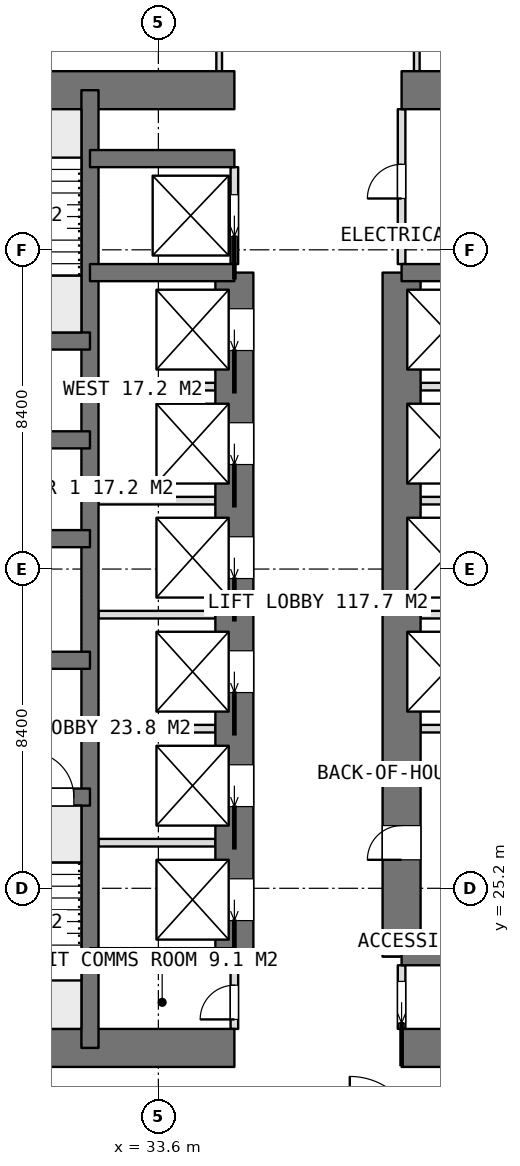
"""IFC4 building model, lengths in metres.
Left out: names, types, materials, properties, quantities, classifications, styles, units other than length and angle.
Written with IfcOpenShell. Run it as: python <this file> out.ifc"""

import sys

from ifc_helpers import new_model, si_unit, direction, frame, frame_2d, origin, place, context, subcontext, project, spatial, rectangle, extrude, element, fill, save


model = new_model("IFC4")
c1 = context("Model", 3, precision=1e-05, world=origin(), true_north=direction((0.0, 1.0)))
c2 = subcontext(c1, "Body", "Model", "MODEL_VIEW")
j1 = project(units=[si_unit("LENGTHUNIT", "METRE"), si_unit("PLANEANGLEUNIT", "RADIAN")], contexts=[c1])
p1 = place(None, origin())
s1 = spatial("IfcSite", under=j1, at=p1, CompositionType="ELEMENT")
p2 = place(p1, origin())
s2 = spatial("IfcBuilding", under=s1, at=p2, CompositionType="ELEMENT")
p3 = place(p2, frame((0.0, 0.0, 159.05)))
s3 = spatial("IfcBuildingStorey", under=s2, at=p3, CompositionType="ELEMENT", Elevation=159.05)
p4 = place(p3, frame((25.2, 21.0, 0.0), z_axis=(0.0, 0.0, 1.0), x_axis=(1.0, 0.0, 0.0)))
e1 = element("IfcWall", 1, at=p4, inside=s3, PredefinedType="SHEAR", context=c2, shape_type="SweptSolid", body=[
    extrude(rectangle(XDim=10.4, YDim=1.0, at=frame_2d((5.2, 0.0))), origin(), (0.0, 0.0, 1.0), 3.75),
])
p5 = place(p3, frame((40.0, 21.0, 0.0), z_axis=(0.0, 0.0, 1.0), x_axis=(1.0, 0.0, 0.0)))
e2 = element("IfcWall", 2, at=p5, inside=s3, PredefinedType="SHEAR", context=c2, shape_type="SweptSolid", body=[
    extrude(rectangle(XDim=10.4, YDim=1.0, at=frame_2d((5.2, 0.0))), origin(), (0.0, 0.0, 1.0), 3.75),
])
p6 = place(p3, frame((25.2, 46.2, 0.0), z_axis=(0.0, 0.0, 1.0), x_axis=(1.0, 0.0, 0.0)))
e3 = element("IfcWall", 3, at=p6, inside=s3, PredefinedType="SHEAR", context=c2, shape_type="SweptSolid", body=[
    extrude(rectangle(XDim=10.4, YDim=1.0, at=frame_2d((5.2, 0.0))), origin(), (0.0, 0.0, 1.0), 3.75),
])
p7 = place(p3, frame((40.0, 46.2, 0.0), z_axis=(0.0, 0.0, 1.0), x_axis=(1.0, 0.0, 0.0)))
e4 = element("IfcWall", 4, at=p7, inside=s3, PredefinedType="SHEAR", context=c2, shape_type="SweptSolid", body=[
    extrude(rectangle(XDim=10.4, YDim=1.0, at=frame_2d((5.2, 0.0))), origin(), (0.0, 0.0, 1.0), 3.75),
])
p8 = place(p3, frame((31.8, 21.0, 0.0), z_axis=(0.0, 0.0, 1.0), x_axis=(0.0, 1.0, 0.0)))
e5 = element("IfcWall", 5, at=p8, inside=s3, PredefinedType="SHEAR", context=c2, shape_type="SweptSolid", body=[
    extrude(rectangle(XDim=25.2, YDim=0.45, at=frame_2d((12.6, 0.0))), origin(), (0.0, 0.0, 1.0), 3.75),
])
p9 = place(p3, frame((35.6, 23.4, 0.0), z_axis=(0.0, 0.0, 1.0), x_axis=(0.0, 1.0, 0.0)))
e6 = element("IfcWall", 6, at=p9, inside=s3, PredefinedType="SHEAR", context=c2, shape_type="SweptSolid", body=[
    extrude(rectangle(XDim=18.0, YDim=1.0, at=frame_2d((9.0, 0.0))), origin(), (0.0, 0.0, 1.0), 3.75),
])
p10 = place(p9, frame((0.95, 0.0, 0.0)))
e7 = element("IfcOpeningElement", 7, at=p10, cuts=e6, PredefinedType="OPENING", context=c2, shape_type="SweptSolid", body=[
    extrude(rectangle(XDim=1.1, YDim=2.1, at=frame_2d((0.55, 1.05))), frame((0.0, 0.51, 0.0), z_axis=(0.0, -1.0, 0.0), x_axis=(1.0, 0.0, 0.0)), (0.0, 0.0, 1.0), 1.02),
])
p11 = place(p9, frame((3.95, 0.0, 0.0)))
e8 = element("IfcOpeningElement", 8, at=p11, cuts=e6, PredefinedType="OPENING", context=c2, shape_type="SweptSolid", body=[
    extrude(rectangle(XDim=1.1, YDim=2.1, at=frame_2d((0.55, 1.05))), frame((0.0, 0.51, 0.0), z_axis=(0.0, -1.0, 0.0), x_axis=(1.0, 0.0, 0.0)), (0.0, 0.0, 1.0), 1.02),
])
p12 = place(p9, frame((6.95, 0.0, 0.0)))
e9 = element("IfcOpeningElement", 9, at=p12, cuts=e6, PredefinedType="OPENING", context=c2, shape_type="SweptSolid", body=[
    extrude(rectangle(XDim=1.1, YDim=2.1, at=frame_2d((0.55, 1.05))), frame((0.0, 0.51, 0.0), z_axis=(0.0, -1.0, 0.0), x_axis=(1.0, 0.0, 0.0)), (0.0, 0.0, 1.0), 1.02),
])
p13 = place(p9, frame((9.95, 0.0, 0.0)))
e10 = element("IfcOpeningElement", 10, at=p13, cuts=e6, PredefinedType="OPENING", context=c2, shape_type="SweptSolid", body=[
    extrude(rectangle(XDim=1.1, YDim=2.1, at=frame_2d((0.55, 1.05))), frame((0.0, 0.51, 0.0), z_axis=(0.0, -1.0, 0.0), x_axis=(1.0, 0.0, 0.0)), (0.0, 0.0, 1.0), 1.02),
])
p14 = place(p9, frame((12.95, 0.0, 0.0)))
e11 = element("IfcOpeningElement", 11, at=p14, cuts=e6, PredefinedType="OPENING", context=c2, shape_type="SweptSolid", body=[
    extrude(rectangle(XDim=1.1, YDim=2.1, at=frame_2d((0.55, 1.05))), frame((0.0, 0.51, 0.0), z_axis=(0.0, -1.0, 0.0), x_axis=(1.0, 0.0, 0.0)), (0.0, 0.0, 1.0), 1.02),
])
p15 = place(p9, frame((15.95, 0.0, 0.0)))
e12 = element("IfcOpeningElement", 12, at=p15, cuts=e6, PredefinedType="OPENING", context=c2, shape_type="SweptSolid", body=[
    extrude(rectangle(XDim=1.1, YDim=2.1, at=frame_2d((0.55, 1.05))), frame((0.0, 0.51, 0.0), z_axis=(0.0, -1.0, 0.0), x_axis=(1.0, 0.0, 0.0)), (0.0, 0.0, 1.0), 1.02),
])
p16 = place(p3, frame((40.0, 23.4, 0.0), z_axis=(0.0, 0.0, 1.0), x_axis=(0.0, 1.0, 0.0)))
e13 = element("IfcWall", 13, at=p16, inside=s3, PredefinedType="SHEAR", context=c2, shape_type="SweptSolid", body=[
    extrude(rectangle(XDim=18.0, YDim=1.0, at=frame_2d((9.0, 0.0))), origin(), (0.0, 0.0, 1.0), 3.75),
])
p17 = place(p16, frame((2.55, 0.0, 0.0)))
e14 = element("IfcOpeningElement", 14, at=p17, cuts=e13, PredefinedType="OPENING", context=c2, shape_type="SweptSolid", body=[
    extrude(rectangle(XDim=0.9, YDim=2.1, at=frame_2d((0.45, 1.05))), frame((0.0, 0.51, 0.0), z_axis=(0.0, -1.0, 0.0), x_axis=(1.0, 0.0, 0.0)), (0.0, 0.0, 1.0), 1.02),
])
for number, where, z_axis, x_axis in (
    (15, (31.8, 23.4, 0.0), (0.0, 0.0, 1.0), (1.0, 0.0, 0.0)),
    (16, (31.8, 41.4, 0.0), (0.0, 0.0, 1.0), (1.0, 0.0, 0.0)),
    (17, (31.8, 44.4, 0.0), (0.0, 0.0, 1.0), (1.0, 0.0, 0.0)),
    (18, (40.0, 23.4, 0.0), (0.0, 0.0, 1.0), (1.0, 0.0, 0.0)),
    (19, (40.0, 41.4, 0.0), (0.0, 0.0, 1.0), (1.0, 0.0, 0.0)),
):
    element("IfcWall", number, at=place(p3, frame(where, z_axis=z_axis, x_axis=x_axis)), inside=s3, PredefinedType="SHEAR", context=c2, shape_type="SweptSolid", body=[
        extrude(rectangle(XDim=3.8, YDim=0.45, at=frame_2d((1.9, 0.0))), origin(), (0.0, 0.0, 1.0), 3.75),
    ])
p18 = place(p3, frame((25.2, 27.6, 0.0), z_axis=(0.0, 0.0, 1.0), x_axis=(1.0, 0.0, 0.0)))
e20 = element("IfcWall", 20, at=p18, inside=s3, PredefinedType="SHEAR", context=c2, shape_type="SweptSolid", body=[
    extrude(rectangle(XDim=6.6, YDim=0.45, at=frame_2d((3.3, 0.0))), origin(), (0.0, 0.0, 1.0), 3.75),
])
p19 = place(p18, frame((4.975, 0.0, 0.0)))
e21 = element("IfcOpeningElement", 21, at=p19, cuts=e20, PredefinedType="OPENING", context=c2, shape_type="SweptSolid", body=[
    extrude(rectangle(XDim=1.2, YDim=2.1, at=frame_2d((0.6, 1.05))), frame((0.0, 0.235, 0.0), z_axis=(0.0, -1.0, 0.0), x_axis=(1.0, 0.0, 0.0)), (0.0, 0.0, 1.0), 0.47),
])
p20 = place(p3, frame((25.2, 31.2, 0.0), z_axis=(0.0, 0.0, 1.0), x_axis=(1.0, 0.0, 0.0)))
e22 = element("IfcWall", 22, at=p20, inside=s3, PredefinedType="SHEAR", context=c2, shape_type="SweptSolid", body=[
    extrude(rectangle(XDim=6.6, YDim=0.45, at=frame_2d((3.3, 0.0))), origin(), (0.0, 0.0, 1.0), 3.75),
])
p21 = place(p20, frame((2.65, 0.0, 0.0)))
e23 = element("IfcOpeningElement", 23, at=p21, cuts=e22, PredefinedType="OPENING", context=c2, shape_type="SweptSolid", body=[
    extrude(rectangle(XDim=1.3, YDim=2.1, at=frame_2d((0.65, 1.05))), frame((0.0, 0.235, 0.0), z_axis=(0.0, -1.0, 0.0), x_axis=(1.0, 0.0, 0.0)), (0.0, 0.0, 1.0), 0.47),
])
for number, where, z_axis, x_axis in (
    (24, (25.2, 34.4, 0.0), (0.0, 0.0, 1.0), (1.0, 0.0, 0.0)),
    (25, (25.2, 37.0, 0.0), (0.0, 0.0, 1.0), (1.0, 0.0, 0.0)),
    (26, (25.2, 39.6, 0.0), (0.0, 0.0, 1.0), (1.0, 0.0, 0.0)),
):
    element("IfcWall", number, at=place(p3, frame(where, z_axis=z_axis, x_axis=x_axis)), inside=s3, PredefinedType="SHEAR", context=c2, shape_type="SweptSolid", body=[
        extrude(rectangle(XDim=6.6, YDim=0.45, at=frame_2d((3.3, 0.0))), origin(), (0.0, 0.0, 1.0), 3.75),
    ])
for number, where, z_axis, x_axis in (
    (27, (32.025, 26.4, 0.0), (0.0, 0.0, 1.0), (1.0, 0.0, 0.0)),
    (28, (32.025, 29.4, 0.0), (0.0, 0.0, 1.0), (1.0, 0.0, 0.0)),
    (29, (32.025, 32.4, 0.0), (0.0, 0.0, 1.0), (1.0, 0.0, 0.0)),
    (30, (32.025, 35.4, 0.0), (0.0, 0.0, 1.0), (1.0, 0.0, 0.0)),
    (31, (32.025, 38.4, 0.0), (0.0, 0.0, 1.0), (1.0, 0.0, 0.0)),
):
    element("IfcWall", number, at=place(p3, frame(where, z_axis=z_axis, x_axis=x_axis)), inside=s3, PredefinedType="PARTITIONING", context=c2, shape_type="SweptSolid", body=[
        extrude(rectangle(XDim=3.075, YDim=0.2, at=frame_2d((1.538, 0.0))), origin(), (0.0, 0.0, 1.0), 3.4),
    ])
for number, where, z_axis, x_axis in (
    (32, (40.5, 29.4, 0.0), (0.0, 0.0, 1.0), (1.0, 0.0, 0.0)),
    (33, (40.5, 32.4, 0.0), (0.0, 0.0, 1.0), (1.0, 0.0, 0.0)),
    (34, (40.5, 35.4, 0.0), (0.0, 0.0, 1.0), (1.0, 0.0, 0.0)),
    (35, (40.5, 38.4, 0.0), (0.0, 0.0, 1.0), (1.0, 0.0, 0.0)),
):
    element("IfcWall", number, at=place(p3, frame(where, z_axis=z_axis, x_axis=x_axis)), inside=s3, PredefinedType="PARTITIONING", context=c2, shape_type="SweptSolid", body=[
        extrude(rectangle(XDim=3.075, YDim=0.2, at=frame_2d((1.538, 0.0))), origin(), (0.0, 0.0, 1.0), 3.4),
    ])
p22 = place(p3, frame((40.0, 21.5, 0.0), z_axis=(0.0, 0.0, 1.0), x_axis=(0.0, 1.0, 0.0)))
e36 = element("IfcWall", 36, at=p22, inside=s3, PredefinedType="PARTITIONING", context=c2, shape_type="SweptSolid", body=[
    extrude(rectangle(XDim=1.675, YDim=0.2, at=frame_2d((0.837, 0.0))), origin(), (0.0, 0.0, 1.0), 3.4),
])
p23 = place(p22, frame((0.15, 0.0, 0.0)))
e37 = element("IfcOpeningElement", 37, at=p23, cuts=e36, PredefinedType="OPENING", context=c2, shape_type="SweptSolid", body=[
    extrude(rectangle(XDim=1.1, YDim=2.1, at=frame_2d((0.55, 1.05))), frame((0.0, 0.11, 0.0), z_axis=(0.0, -1.0, 0.0), x_axis=(1.0, 0.0, 0.0)), (0.0, 0.0, 1.0), 0.22),
])
p24 = place(p3, frame((40.0, 41.625, 0.0), z_axis=(0.0, 0.0, 1.0), x_axis=(0.0, 1.0, 0.0)))
e38 = element("IfcWall", 38, at=p24, inside=s3, PredefinedType="PARTITIONING", context=c2, shape_type="SweptSolid", body=[
    extrude(rectangle(XDim=4.075, YDim=0.2, at=frame_2d((2.038, 0.0))), origin(), (0.0, 0.0, 1.0), 3.4),
])
p25 = place(p24, frame((1.725, 0.0, 0.0)))
e39 = element("IfcOpeningElement", 39, at=p25, cuts=e38, PredefinedType="OPENING", context=c2, shape_type="SweptSolid", body=[
    extrude(rectangle(XDim=0.9, YDim=2.1, at=frame_2d((0.45, 1.05))), frame((0.0, 0.11, 0.0), z_axis=(0.0, -1.0, 0.0), x_axis=(1.0, 0.0, 0.0)), (0.0, 0.0, 1.0), 0.22),
])
p26 = place(p3, frame((35.6, 41.625, 0.0), z_axis=(0.0, 0.0, 1.0), x_axis=(0.0, 1.0, 0.0)))
e40 = element("IfcWall", 40, at=p26, inside=s3, PredefinedType="PARTITIONING", context=c2, shape_type="SweptSolid", body=[
    extrude(rectangle(XDim=2.55, YDim=0.2, at=frame_2d((1.275, 0.0))), origin(), (0.0, 0.0, 1.0), 3.4),
])
p27 = place(p26, frame((0.725, 0.0, 0.0)))
e41 = element("IfcOpeningElement", 41, at=p27, cuts=e40, PredefinedType="OPENING", context=c2, shape_type="SweptSolid", body=[
    extrude(rectangle(XDim=1.1, YDim=2.1, at=frame_2d((0.55, 1.05))), frame((0.0, 0.11, 0.0), z_axis=(0.0, -1.0, 0.0), x_axis=(1.0, 0.0, 0.0)), (0.0, 0.0, 1.0), 0.22),
])
p28 = place(p3, frame((35.6, 21.5, 0.0), z_axis=(0.0, 0.0, 1.0), x_axis=(0.0, 1.0, 0.0)))
e42 = element("IfcWall", 42, at=p28, inside=s3, PredefinedType="PARTITIONING", context=c2, shape_type="SweptSolid", body=[
    extrude(rectangle(XDim=1.675, YDim=0.2, at=frame_2d((0.837, 0.0))), origin(), (0.0, 0.0, 1.0), 3.4),
])
p29 = place(p28, frame((0.25, 0.0, 0.0)))
e43 = element("IfcOpeningElement", 43, at=p29, cuts=e42, PredefinedType="OPENING", context=c2, shape_type="SweptSolid", body=[
    extrude(rectangle(XDim=0.9, YDim=2.1, at=frame_2d((0.45, 1.05))), frame((0.0, 0.11, 0.0), z_axis=(0.0, -1.0, 0.0), x_axis=(1.0, 0.0, 0.0)), (0.0, 0.0, 1.0), 0.22),
])
for number, where, z_axis, x_axis in (
    (44, (40.4, 46.7, 0.0), (0.0, 0.0, 1.0), (0.0, 1.0, 0.0)),
    (45, (35.2, 46.7, 0.0), (0.0, 0.0, 1.0), (0.0, 1.0, 0.0)),
):
    element("IfcWall", number, at=place(p3, frame(where, z_axis=z_axis, x_axis=x_axis)), inside=s3, PredefinedType="PARTITIONING", context=c2, shape_type="SweptSolid", body=[
        extrude(rectangle(XDim=2.625, YDim=0.15, at=frame_2d((1.312, 0.0))), origin(), (0.0, 0.0, 1.0), 3.4),
    ])
p30 = place(p23, origin())
e46 = element("IfcDoor", 46, at=p30, inside=s3, OperationType="SLIDING_TO_LEFT", PredefinedType="DOOR", context=c2, shape_type="SweptSolid", body=[
    extrude(rectangle(XDim=1.1, YDim=2.1, at=frame_2d((0.55, 1.05))), frame((0.0, 0.025, 0.0), z_axis=(0.0, -1.0, 0.0), x_axis=(1.0, 0.0, 0.0)), (0.0, 0.0, 1.0), 0.05),
])
fill(e37, e46)
p31 = place(p29, origin())
e47 = element("IfcDoor", 47, at=p31, inside=s3, OperationType="SINGLE_SWING_LEFT", PredefinedType="DOOR", context=c2, shape_type="SweptSolid", body=[
    extrude(rectangle(XDim=0.9, YDim=2.1, at=frame_2d((0.45, 1.05))), frame((0.0, 0.025, 0.0), z_axis=(0.0, -1.0, 0.0), x_axis=(1.0, 0.0, 0.0)), (0.0, 0.0, 1.0), 0.05),
])
fill(e43, e47)
p32 = place(p25, origin())
e48 = element("IfcDoor", 48, at=p32, inside=s3, OperationType="SINGLE_SWING_LEFT", PredefinedType="DOOR", context=c2, shape_type="SweptSolid", body=[
    extrude(rectangle(XDim=0.9, YDim=2.1, at=frame_2d((0.45, 1.05))), frame((0.0, 0.025, 0.0), z_axis=(0.0, -1.0, 0.0), x_axis=(1.0, 0.0, 0.0)), (0.0, 0.0, 1.0), 0.05),
])
fill(e39, e48)
p33 = place(p17, origin())
e49 = element("IfcDoor", 49, at=p33, inside=s3, OperationType="SINGLE_SWING_LEFT", PredefinedType="DOOR", context=c2, shape_type="SweptSolid", body=[
    extrude(rectangle(XDim=0.9, YDim=2.1, at=frame_2d((0.45, 1.05))), frame((0.0, 0.025, 0.0), z_axis=(0.0, -1.0, 0.0), x_axis=(1.0, 0.0, 0.0)), (0.0, 0.0, 1.0), 0.05),
])
fill(e14, e49)
p34 = place(p10, origin())
e50 = element("IfcDoor", 50, at=p34, inside=s3, OperationType="SLIDING_TO_LEFT", PredefinedType="USERDEFINED", context=c2, shape_type="SweptSolid", body=[
    extrude(rectangle(XDim=1.1, YDim=2.1, at=frame_2d((0.55, 1.05))), frame((0.0, 0.025, 0.0), z_axis=(0.0, -1.0, 0.0), x_axis=(1.0, 0.0, 0.0)), (0.0, 0.0, 1.0), 0.05),
])
fill(e7, e50)
p35 = place(p11, origin())
e51 = element("IfcDoor", 51, at=p35, inside=s3, OperationType="SLIDING_TO_LEFT", PredefinedType="USERDEFINED", context=c2, shape_type="SweptSolid", body=[
    extrude(rectangle(XDim=1.1, YDim=2.1, at=frame_2d((0.55, 1.05))), frame((0.0, 0.025, 0.0), z_axis=(0.0, -1.0, 0.0), x_axis=(1.0, 0.0, 0.0)), (0.0, 0.0, 1.0), 0.05),
])
fill(e8, e51)
p36 = place(p12, origin())
e52 = element("IfcDoor", 52, at=p36, inside=s3, OperationType="SLIDING_TO_LEFT", PredefinedType="USERDEFINED", context=c2, shape_type="SweptSolid", body=[
    extrude(rectangle(XDim=1.1, YDim=2.1, at=frame_2d((0.55, 1.05))), frame((0.0, 0.025, 0.0), z_axis=(0.0, -1.0, 0.0), x_axis=(1.0, 0.0, 0.0)), (0.0, 0.0, 1.0), 0.05),
])
fill(e9, e52)
p37 = place(p13, origin())
e53 = element("IfcDoor", 53, at=p37, inside=s3, OperationType="SLIDING_TO_LEFT", PredefinedType="USERDEFINED", context=c2, shape_type="SweptSolid", body=[
    extrude(rectangle(XDim=1.1, YDim=2.1, at=frame_2d((0.55, 1.05))), frame((0.0, 0.025, 0.0), z_axis=(0.0, -1.0, 0.0), x_axis=(1.0, 0.0, 0.0)), (0.0, 0.0, 1.0), 0.05),
])
fill(e10, e53)
p38 = place(p14, origin())
e54 = element("IfcDoor", 54, at=p38, inside=s3, OperationType="SLIDING_TO_LEFT", PredefinedType="USERDEFINED", context=c2, shape_type="SweptSolid", body=[
    extrude(rectangle(XDim=1.1, YDim=2.1, at=frame_2d((0.55, 1.05))), frame((0.0, 0.025, 0.0), z_axis=(0.0, -1.0, 0.0), x_axis=(1.0, 0.0, 0.0)), (0.0, 0.0, 1.0), 0.05),
])
fill(e11, e54)
p39 = place(p15, origin())
e55 = element("IfcDoor", 55, at=p39, inside=s3, OperationType="SLIDING_TO_LEFT", PredefinedType="USERDEFINED", context=c2, shape_type="SweptSolid", body=[
    extrude(rectangle(XDim=1.1, YDim=2.1, at=frame_2d((0.55, 1.05))), frame((0.0, 0.025, 0.0), z_axis=(0.0, -1.0, 0.0), x_axis=(1.0, 0.0, 0.0)), (0.0, 0.0, 1.0), 0.05),
])
fill(e12, e55)
p40 = place(p27, origin())
e56 = element("IfcDoor", 56, at=p40, inside=s3, OperationType="SLIDING_TO_LEFT", PredefinedType="USERDEFINED", context=c2, shape_type="SweptSolid", body=[
    extrude(rectangle(XDim=1.1, YDim=2.1, at=frame_2d((0.55, 1.05))), frame((0.0, 0.025, 0.0), z_axis=(0.0, -1.0, 0.0), x_axis=(1.0, 0.0, 0.0)), (0.0, 0.0, 1.0), 0.05),
])
fill(e41, e56)
p41 = place(p19, origin())
e57 = element("IfcDoor", 57, at=p41, inside=s3, OperationType="SINGLE_SWING_RIGHT", PredefinedType="DOOR", context=c2, shape_type="SweptSolid", body=[
    extrude(rectangle(XDim=1.2, YDim=2.1, at=frame_2d((0.6, 1.05))), frame((0.0, 0.025, 0.0), z_axis=(0.0, -1.0, 0.0), x_axis=(1.0, 0.0, 0.0)), (0.0, 0.0, 1.0), 0.05),
])
fill(e21, e57)
save(model, sys.argv[1])
